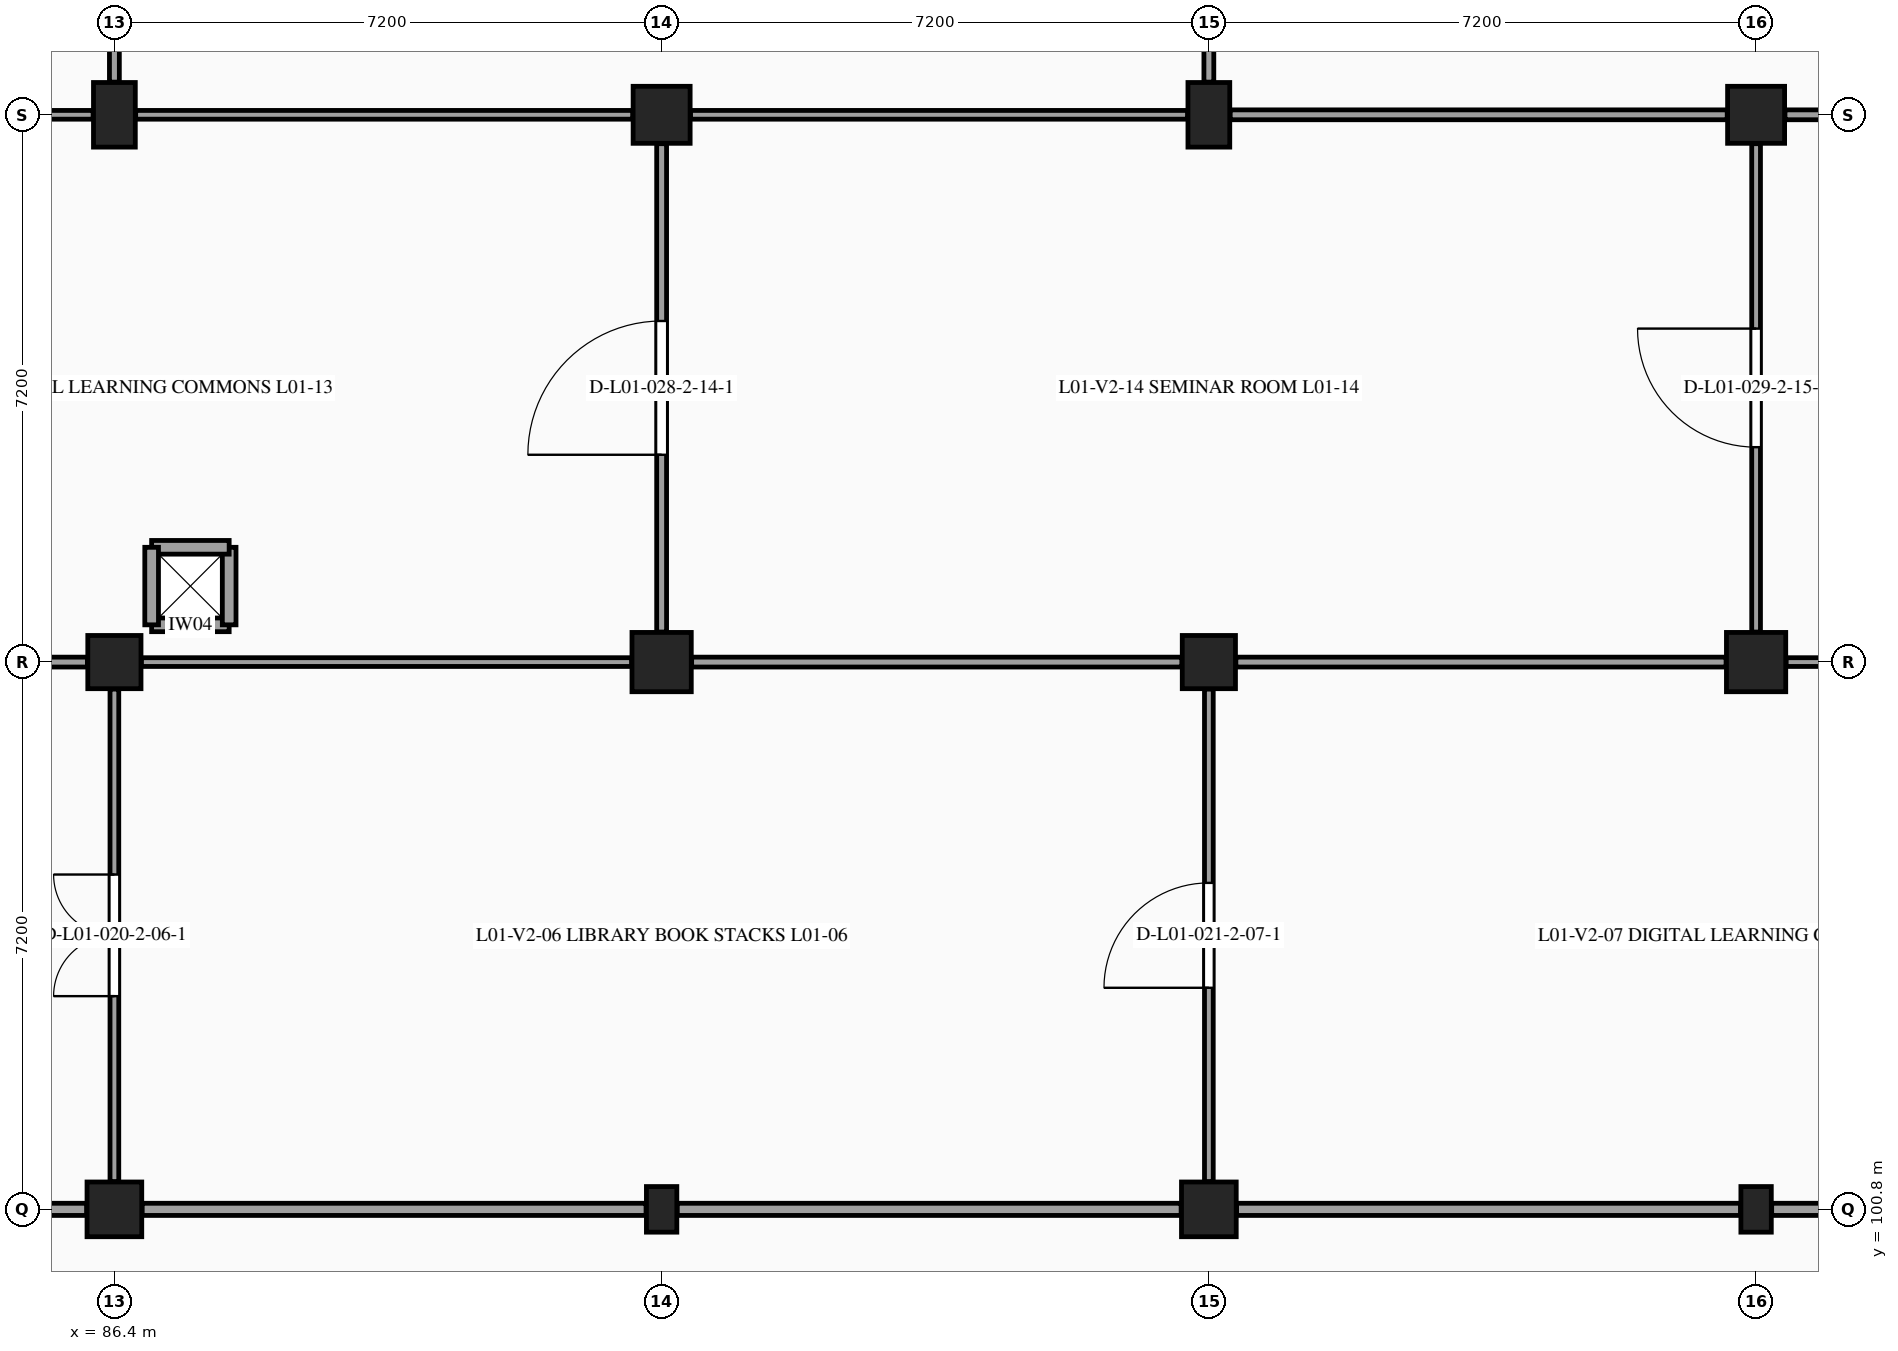
"""IFC4 building model, lengths in metres.
Left out: names, types, materials, properties, quantities, classifications, styles, units other than length and angle.
Written with IfcOpenShell. Run it as: python <this file> out.ifc"""

import sys

from ifc_helpers import new_model, si_unit, direction, frame, frame_2d, origin, origin_2d, place, context, subcontext, project, spatial, rectangle, extrude, element, fill, save


model = new_model("IFC4")
c1 = context("Model", 3, precision=1e-05, world=origin(), true_north=direction((0.0, 1.0)))
c2 = subcontext(c1, "Body", "Model", "MODEL_VIEW")
j1 = project(units=[si_unit("LENGTHUNIT", "METRE"), si_unit("PLANEANGLEUNIT", "RADIAN")], contexts=[c1])
p1 = place(None, origin())
s1 = spatial("IfcSite", under=j1, at=p1, CompositionType="ELEMENT")
p2 = place(p1, origin())
s2 = spatial("IfcBuilding", under=s1, at=p2, CompositionType="ELEMENT")
p3 = place(p2, frame((0.0, 0.0, 5.4)))
s3 = spatial("IfcBuildingStorey", under=s2, at=p3, CompositionType="ELEMENT", Elevation=5.4)
p4 = place(p3, frame((86.4, 100.8, 0.0), z_axis=(0.0, 0.0, 1.0), x_axis=(1.0, 0.0, 0.0)))
e1 = element("IfcColumn", 1, at=p4, inside=s3, PredefinedType="COLUMN", context=c2, shape_type="SweptSolid", body=[
    extrude(rectangle(XDim=0.72, YDim=0.72, at=origin_2d()), origin(), (0.0, 0.0, 1.0), 4.5),
])
p5 = place(p3, frame((86.4, 108.0, 0.0), z_axis=(0.0, 0.0, 1.0), x_axis=(1.0, 0.0, 0.0)))
e2 = element("IfcColumn", 2, at=p5, inside=s3, PredefinedType="COLUMN", context=c2, shape_type="SweptSolid", body=[
    extrude(rectangle(XDim=0.7, YDim=0.7, at=origin_2d()), origin(), (0.0, 0.0, 1.0), 4.5),
])
p6 = place(p3, frame((86.4, 115.2, 0.0), z_axis=(0.0, 0.0, 1.0), x_axis=(1.0, 0.0, 0.0)))
e3 = element("IfcColumn", 3, at=p6, inside=s3, PredefinedType="COLUMN", context=c2, shape_type="SweptSolid", body=[
    extrude(rectangle(XDim=0.55, YDim=0.85, at=origin_2d()), origin(), (0.0, 0.0, 1.0), 4.5),
])
p7 = place(p3, frame((93.6, 100.8, 0.0), z_axis=(0.0, 0.0, 1.0), x_axis=(1.0, 0.0, 0.0)))
e4 = element("IfcColumn", 4, at=p7, inside=s3, PredefinedType="PILASTER", context=c2, shape_type="SweptSolid", body=[
    extrude(rectangle(XDim=0.4, YDim=0.6, at=origin_2d()), origin(), (0.0, 0.0, 1.0), 4.5),
])
p8 = place(p3, frame((93.6, 108.0, 0.0), z_axis=(0.0, 0.0, 1.0), x_axis=(1.0, 0.0, 0.0)))
e5 = element("IfcColumn", 5, at=p8, inside=s3, PredefinedType="COLUMN", context=c2, shape_type="SweptSolid", body=[
    extrude(rectangle(XDim=0.78, YDim=0.78, at=origin_2d()), origin(), (0.0, 0.0, 1.0), 4.5),
])
p9 = place(p3, frame((93.6, 115.2, 0.0), z_axis=(0.0, 0.0, 1.0), x_axis=(1.0, 0.0, 0.0)))
e6 = element("IfcColumn", 6, at=p9, inside=s3, PredefinedType="COLUMN", context=c2, shape_type="SweptSolid", body=[
    extrude(rectangle(XDim=0.75, YDim=0.75, at=origin_2d()), origin(), (0.0, 0.0, 1.0), 4.5),
])
p10 = place(p3, frame((100.8, 100.8, 0.0), z_axis=(0.0, 0.0, 1.0), x_axis=(1.0, 0.0, 0.0)))
e7 = element("IfcColumn", 7, at=p10, inside=s3, PredefinedType="COLUMN", context=c2, shape_type="SweptSolid", body=[
    extrude(rectangle(XDim=0.72, YDim=0.72, at=origin_2d()), origin(), (0.0, 0.0, 1.0), 4.5),
])
p11 = place(p3, frame((100.8, 108.0, 0.0), z_axis=(0.0, 0.0, 1.0), x_axis=(1.0, 0.0, 0.0)))
e8 = element("IfcColumn", 8, at=p11, inside=s3, PredefinedType="COLUMN", context=c2, shape_type="SweptSolid", body=[
    extrude(rectangle(XDim=0.7, YDim=0.7, at=origin_2d()), origin(), (0.0, 0.0, 1.0), 4.5),
])
p12 = place(p3, frame((100.8, 115.2, 0.0), z_axis=(0.0, 0.0, 1.0), x_axis=(1.0, 0.0, 0.0)))
e9 = element("IfcColumn", 9, at=p12, inside=s3, PredefinedType="COLUMN", context=c2, shape_type="SweptSolid", body=[
    extrude(rectangle(XDim=0.55, YDim=0.85, at=origin_2d()), origin(), (0.0, 0.0, 1.0), 4.5),
])
p13 = place(p3, frame((108.0, 100.8, 0.0), z_axis=(0.0, 0.0, 1.0), x_axis=(1.0, 0.0, 0.0)))
e10 = element("IfcColumn", 10, at=p13, inside=s3, PredefinedType="PILASTER", context=c2, shape_type="SweptSolid", body=[
    extrude(rectangle(XDim=0.4, YDim=0.6, at=origin_2d()), origin(), (0.0, 0.0, 1.0), 4.5),
])
p14 = place(p3, frame((108.0, 108.0, 0.0), z_axis=(0.0, 0.0, 1.0), x_axis=(1.0, 0.0, 0.0)))
e11 = element("IfcColumn", 11, at=p14, inside=s3, PredefinedType="COLUMN", context=c2, shape_type="SweptSolid", body=[
    extrude(rectangle(XDim=0.78, YDim=0.78, at=origin_2d()), origin(), (0.0, 0.0, 1.0), 4.5),
])
p15 = place(p3, frame((108.0, 115.2, 0.0), z_axis=(0.0, 0.0, 1.0), x_axis=(1.0, 0.0, 0.0)))
e12 = element("IfcColumn", 12, at=p15, inside=s3, PredefinedType="COLUMN", context=c2, shape_type="SweptSolid", body=[
    extrude(rectangle(XDim=0.75, YDim=0.75, at=origin_2d()), origin(), (0.0, 0.0, 1.0), 4.5),
])
for number, where, z_axis, x_axis in (
    (13, (86.89, 108.49, 0.0), (0.0, 0.0, 1.0), (1.0, 0.0, 0.0)),
    (14, (87.91, 108.49, 0.0), (0.0, 0.0, 1.0), (0.0, 1.0, 0.0)),
    (15, (87.91, 109.51, 0.0), (0.0, 0.0, 1.0), (-1.0, 0.0, 0.0)),
    (16, (86.89, 109.51, 0.0), (0.0, 0.0, 1.0), (0.0, -1.0, 0.0)),
):
    element("IfcWall", number, at=place(p3, frame(where, z_axis=z_axis, x_axis=x_axis)), inside=s3, PredefinedType="PARTITIONING", context=c2, shape_type="SweptSolid", body=[
        extrude(rectangle(XDim=1.02, YDim=0.18, at=frame_2d((0.51, 0.0))), origin(), (0.0, 0.0, 1.0), 4.21),
    ])
p16 = place(p3, frame((79.405, 100.8, 0.0), z_axis=(0.0, 0.0, 1.0), x_axis=(1.0, 0.0, 0.0)))
e17 = element("IfcWall", 17, at=p16, inside=s3, PredefinedType="PARTITIONING", context=c2, shape_type="SweptSolid", body=[
    extrude(rectangle(XDim=6.63, YDim=0.16, at=frame_2d((3.315, 0.0))), origin(), (0.0, 0.0, 1.0), 3.47),
])
p17 = place(p3, frame((86.4, 101.165, 0.0), z_axis=(0.0, 0.0, 1.0), x_axis=(0.0, 1.0, 0.0)))
e18 = element("IfcWall", 18, at=p17, inside=s3, PredefinedType="PARTITIONING", context=c2, shape_type="SweptSolid", body=[
    extrude(rectangle(XDim=6.48, YDim=0.115, at=frame_2d((3.24, 0.0))), origin(), (0.0, 0.0, 1.0), 3.525),
])
p18 = place(p17, frame((2.44, 0.0, 0.0)))
e19 = element("IfcOpeningElement", 19, at=p18, cuts=e18, PredefinedType="OPENING", context=c2, shape_type="SweptSolid", body=[
    extrude(rectangle(XDim=1.6, YDim=2.2, at=frame_2d((0.8, 1.1))), frame((0.0, 0.067, 0.0), z_axis=(0.0, -1.0, 0.0), x_axis=(1.0, 0.0, 0.0)), (0.0, 0.0, 1.0), 0.135),
])
p19 = place(p3, frame((79.595, 108.0, 0.0), z_axis=(0.0, 0.0, 1.0), x_axis=(1.0, 0.0, 0.0)))
e20 = element("IfcWall", 20, at=p19, inside=s3, PredefinedType="PARTITIONING", context=c2, shape_type="SweptSolid", body=[
    extrude(rectangle(XDim=6.45, YDim=0.13, at=frame_2d((3.225, 0.0))), origin(), (0.0, 0.0, 1.0), 3.47),
])
p20 = place(p3, frame((79.58, 115.2, 0.0), z_axis=(0.0, 0.0, 1.0), x_axis=(1.0, 0.0, 0.0)))
e21 = element("IfcWall", 21, at=p20, inside=s3, PredefinedType="PARTITIONING", context=c2, shape_type="SweptSolid", body=[
    extrude(rectangle(XDim=6.54, YDim=0.115, at=frame_2d((3.27, 0.0))), origin(), (0.0, 0.0, 1.0), 3.47),
])
p21 = place(p3, frame((86.4, 115.63, 0.0), z_axis=(0.0, 0.0, 1.0), x_axis=(0.0, 1.0, 0.0)))
e22 = element("IfcWall", 22, at=p21, inside=s3, PredefinedType="PARTITIONING", context=c2, shape_type="SweptSolid", body=[
    extrude(rectangle(XDim=6.465, YDim=0.13, at=frame_2d((3.232, 0.0))), origin(), (0.0, 0.0, 1.0), 3.52),
])
p22 = place(p21, frame((2.433, 0.0, 0.0)))
e23 = element("IfcOpeningElement", 23, at=p22, cuts=e22, PredefinedType="OPENING", context=c2, shape_type="SweptSolid", body=[
    extrude(rectangle(XDim=1.6, YDim=2.2, at=frame_2d((0.8, 1.1))), frame((0.0, 0.075, 0.0), z_axis=(0.0, -1.0, 0.0), x_axis=(1.0, 0.0, 0.0)), (0.0, 0.0, 1.0), 0.15),
])
p23 = place(p3, frame((86.765, 100.8, 0.0), z_axis=(0.0, 0.0, 1.0), x_axis=(1.0, 0.0, 0.0)))
e24 = element("IfcWall", 24, at=p23, inside=s3, PredefinedType="PARTITIONING", context=c2, shape_type="SweptSolid", body=[
    extrude(rectangle(XDim=6.63, YDim=0.16, at=frame_2d((3.315, 0.0))), origin(), (0.0, 0.0, 1.0), 3.485),
])
p24 = place(p3, frame((86.755, 108.0, 0.0), z_axis=(0.0, 0.0, 1.0), x_axis=(1.0, 0.0, 0.0)))
e25 = element("IfcWall", 25, at=p24, inside=s3, PredefinedType="PARTITIONING", context=c2, shape_type="SweptSolid", body=[
    extrude(rectangle(XDim=6.45, YDim=0.115, at=frame_2d((3.225, 0.0))), origin(), (0.0, 0.0, 1.0), 3.485),
])
p25 = place(p3, frame((93.6, 108.395, 0.0), z_axis=(0.0, 0.0, 1.0), x_axis=(0.0, 1.0, 0.0)))
e26 = element("IfcWall", 26, at=p25, inside=s3, PredefinedType="PARTITIONING", context=c2, shape_type="SweptSolid", body=[
    extrude(rectangle(XDim=6.425, YDim=0.13, at=frame_2d((3.212, 0.0))), origin(), (0.0, 0.0, 1.0), 3.525),
])
p26 = place(p25, frame((2.333, 0.0, 0.0)))
e27 = element("IfcOpeningElement", 27, at=p26, cuts=e26, PredefinedType="OPENING", context=c2, shape_type="SweptSolid", body=[
    extrude(rectangle(XDim=1.76, YDim=2.3, at=frame_2d((0.88, 1.15))), frame((0.0, 0.075, 0.0), z_axis=(0.0, -1.0, 0.0), x_axis=(1.0, 0.0, 0.0)), (0.0, 0.0, 1.0), 0.15),
])
p27 = place(p3, frame((86.68, 115.2, 0.0), z_axis=(0.0, 0.0, 1.0), x_axis=(1.0, 0.0, 0.0)))
e28 = element("IfcWall", 28, at=p27, inside=s3, PredefinedType="PARTITIONING", context=c2, shape_type="SweptSolid", body=[
    extrude(rectangle(XDim=6.54, YDim=0.115, at=frame_2d((3.27, 0.0))), origin(), (0.0, 0.0, 1.0), 3.485),
])
p28 = place(p3, frame((93.805, 100.8, 0.0), z_axis=(0.0, 0.0, 1.0), x_axis=(1.0, 0.0, 0.0)))
e29 = element("IfcWall", 29, at=p28, inside=s3, PredefinedType="PARTITIONING", context=c2, shape_type="SweptSolid", body=[
    extrude(rectangle(XDim=6.63, YDim=0.16, at=frame_2d((3.315, 0.0))), origin(), (0.0, 0.0, 1.0), 3.49),
])
p29 = place(p3, frame((100.8, 101.165, 0.0), z_axis=(0.0, 0.0, 1.0), x_axis=(0.0, 1.0, 0.0)))
e30 = element("IfcWall", 30, at=p29, inside=s3, PredefinedType="PARTITIONING", context=c2, shape_type="SweptSolid", body=[
    extrude(rectangle(XDim=6.48, YDim=0.115, at=frame_2d((3.24, 0.0))), origin(), (0.0, 0.0, 1.0), 3.525),
])
p30 = place(p29, frame((2.55, 0.0, 0.0)))
e31 = element("IfcOpeningElement", 31, at=p30, cuts=e30, PredefinedType="OPENING", context=c2, shape_type="SweptSolid", body=[
    extrude(rectangle(XDim=1.38, YDim=2.22, at=frame_2d((0.69, 1.11))), frame((0.0, 0.067, 0.0), z_axis=(0.0, -1.0, 0.0), x_axis=(1.0, 0.0, 0.0)), (0.0, 0.0, 1.0), 0.135),
])
p31 = place(p3, frame((93.995, 108.0, 0.0), z_axis=(0.0, 0.0, 1.0), x_axis=(1.0, 0.0, 0.0)))
e32 = element("IfcWall", 32, at=p31, inside=s3, PredefinedType="PARTITIONING", context=c2, shape_type="SweptSolid", body=[
    extrude(rectangle(XDim=6.45, YDim=0.13, at=frame_2d((3.225, 0.0))), origin(), (0.0, 0.0, 1.0), 3.49),
])
p32 = place(p3, frame((93.98, 115.2, 0.0), z_axis=(0.0, 0.0, 1.0), x_axis=(1.0, 0.0, 0.0)))
e33 = element("IfcWall", 33, at=p32, inside=s3, PredefinedType="PARTITIONING", context=c2, shape_type="SweptSolid", body=[
    extrude(rectangle(XDim=6.54, YDim=0.115, at=frame_2d((3.27, 0.0))), origin(), (0.0, 0.0, 1.0), 3.49),
])
p33 = place(p3, frame((100.8, 115.63, 0.0), z_axis=(0.0, 0.0, 1.0), x_axis=(0.0, 1.0, 0.0)))
e34 = element("IfcWall", 34, at=p33, inside=s3, PredefinedType="PARTITIONING", context=c2, shape_type="SweptSolid", body=[
    extrude(rectangle(XDim=6.465, YDim=0.13, at=frame_2d((3.232, 0.0))), origin(), (0.0, 0.0, 1.0), 3.52),
])
p34 = place(p33, frame((2.433, 0.0, 0.0)))
e35 = element("IfcOpeningElement", 35, at=p34, cuts=e34, PredefinedType="OPENING", context=c2, shape_type="SweptSolid", body=[
    extrude(rectangle(XDim=1.6, YDim=2.2, at=frame_2d((0.8, 1.1))), frame((0.0, 0.075, 0.0), z_axis=(0.0, -1.0, 0.0), x_axis=(1.0, 0.0, 0.0)), (0.0, 0.0, 1.0), 0.15),
])
p35 = place(p3, frame((101.165, 100.8, 0.0), z_axis=(0.0, 0.0, 1.0), x_axis=(1.0, 0.0, 0.0)))
e36 = element("IfcWall", 36, at=p35, inside=s3, PredefinedType="PARTITIONING", context=c2, shape_type="SweptSolid", body=[
    extrude(rectangle(XDim=6.63, YDim=0.16, at=frame_2d((3.315, 0.0))), origin(), (0.0, 0.0, 1.0), 3.51),
])
p36 = place(p3, frame((101.155, 108.0, 0.0), z_axis=(0.0, 0.0, 1.0), x_axis=(1.0, 0.0, 0.0)))
e37 = element("IfcWall", 37, at=p36, inside=s3, PredefinedType="PARTITIONING", context=c2, shape_type="SweptSolid", body=[
    extrude(rectangle(XDim=6.45, YDim=0.13, at=frame_2d((3.225, 0.0))), origin(), (0.0, 0.0, 1.0), 3.51),
])
p37 = place(p3, frame((108.0, 108.395, 0.0), z_axis=(0.0, 0.0, 1.0), x_axis=(0.0, 1.0, 0.0)))
e38 = element("IfcWall", 38, at=p37, inside=s3, PredefinedType="PARTITIONING", context=c2, shape_type="SweptSolid", body=[
    extrude(rectangle(XDim=6.425, YDim=0.115, at=frame_2d((3.212, 0.0))), origin(), (0.0, 0.0, 1.0), 3.525),
])
p38 = place(p37, frame((2.433, 0.0, 0.0)))
e39 = element("IfcOpeningElement", 39, at=p38, cuts=e38, PredefinedType="OPENING", context=c2, shape_type="SweptSolid", body=[
    extrude(rectangle(XDim=1.56, YDim=2.25, at=frame_2d((0.78, 1.125))), frame((0.0, 0.067, 0.0), z_axis=(0.0, -1.0, 0.0), x_axis=(1.0, 0.0, 0.0)), (0.0, 0.0, 1.0), 0.135),
])
p39 = place(p3, frame((101.08, 115.2, 0.0), z_axis=(0.0, 0.0, 1.0), x_axis=(1.0, 0.0, 0.0)))
e40 = element("IfcWall", 40, at=p39, inside=s3, PredefinedType="PARTITIONING", context=c2, shape_type="SweptSolid", body=[
    extrude(rectangle(XDim=6.54, YDim=0.13, at=frame_2d((3.27, 0.0))), origin(), (0.0, 0.0, 1.0), 3.51),
])
p40 = place(p3, frame((108.205, 100.8, 0.0), z_axis=(0.0, 0.0, 1.0), x_axis=(1.0, 0.0, 0.0)))
e41 = element("IfcWall", 41, at=p40, inside=s3, PredefinedType="PARTITIONING", context=c2, shape_type="SweptSolid", body=[
    extrude(rectangle(XDim=6.63, YDim=0.16, at=frame_2d((3.315, 0.0))), origin(), (0.0, 0.0, 1.0), 3.55),
])
p41 = place(p3, frame((108.395, 108.0, 0.0), z_axis=(0.0, 0.0, 1.0), x_axis=(1.0, 0.0, 0.0)))
e42 = element("IfcWall", 42, at=p41, inside=s3, PredefinedType="PARTITIONING", context=c2, shape_type="SweptSolid", body=[
    extrude(rectangle(XDim=6.45, YDim=0.115, at=frame_2d((3.225, 0.0))), origin(), (0.0, 0.0, 1.0), 3.55),
])
p42 = place(p3, frame((108.38, 115.2, 0.0), z_axis=(0.0, 0.0, 1.0), x_axis=(1.0, 0.0, 0.0)))
e43 = element("IfcWall", 43, at=p42, inside=s3, PredefinedType="PARTITIONING", context=c2, shape_type="SweptSolid", body=[
    extrude(rectangle(XDim=6.54, YDim=0.13, at=frame_2d((3.27, 0.0))), origin(), (0.0, 0.0, 1.0), 3.55),
])
p43 = place(p18, origin())
e44 = element("IfcDoor", 44, at=p43, inside=s3, OperationType="DOUBLE_DOOR_SINGLE_SWING", PredefinedType="DOOR", context=c2, shape_type="SweptSolid", body=[
    extrude(rectangle(XDim=1.6, YDim=2.2, at=frame_2d((0.8, 1.1))), frame((0.0, 0.025, 0.0), z_axis=(0.0, -1.0, 0.0), x_axis=(1.0, 0.0, 0.0)), (0.0, 0.0, 1.0), 0.05),
])
fill(e19, e44)
p44 = place(p30, origin())
e45 = element("IfcDoor", 45, at=p44, inside=s3, OperationType="SINGLE_SWING_LEFT", PredefinedType="DOOR", context=c2, shape_type="SweptSolid", body=[
    extrude(rectangle(XDim=1.38, YDim=2.22, at=frame_2d((0.69, 1.11))), frame((0.0, 0.025, 0.0), z_axis=(0.0, -1.0, 0.0), x_axis=(1.0, 0.0, 0.0)), (0.0, 0.0, 1.0), 0.05),
])
fill(e31, e45)
p45 = place(p26, origin())
e46 = element("IfcDoor", 46, at=p45, inside=s3, OperationType="SINGLE_SWING_LEFT", PredefinedType="DOOR", context=c2, shape_type="SweptSolid", body=[
    extrude(rectangle(XDim=1.76, YDim=2.3, at=frame_2d((0.88, 1.15))), frame((0.0, 0.025, 0.0), z_axis=(0.0, -1.0, 0.0), x_axis=(1.0, 0.0, 0.0)), (0.0, 0.0, 1.0), 0.05),
])
fill(e27, e46)
p46 = place(p38, origin())
e47 = element("IfcDoor", 47, at=p46, inside=s3, OperationType="SINGLE_SWING_RIGHT", PredefinedType="DOOR", context=c2, shape_type="SweptSolid", body=[
    extrude(rectangle(XDim=1.56, YDim=2.25, at=frame_2d((0.78, 1.125))), frame((0.0, 0.025, 0.0), z_axis=(0.0, -1.0, 0.0), x_axis=(1.0, 0.0, 0.0)), (0.0, 0.0, 1.0), 0.05),
])
fill(e39, e47)
save(model, sys.argv[1])
